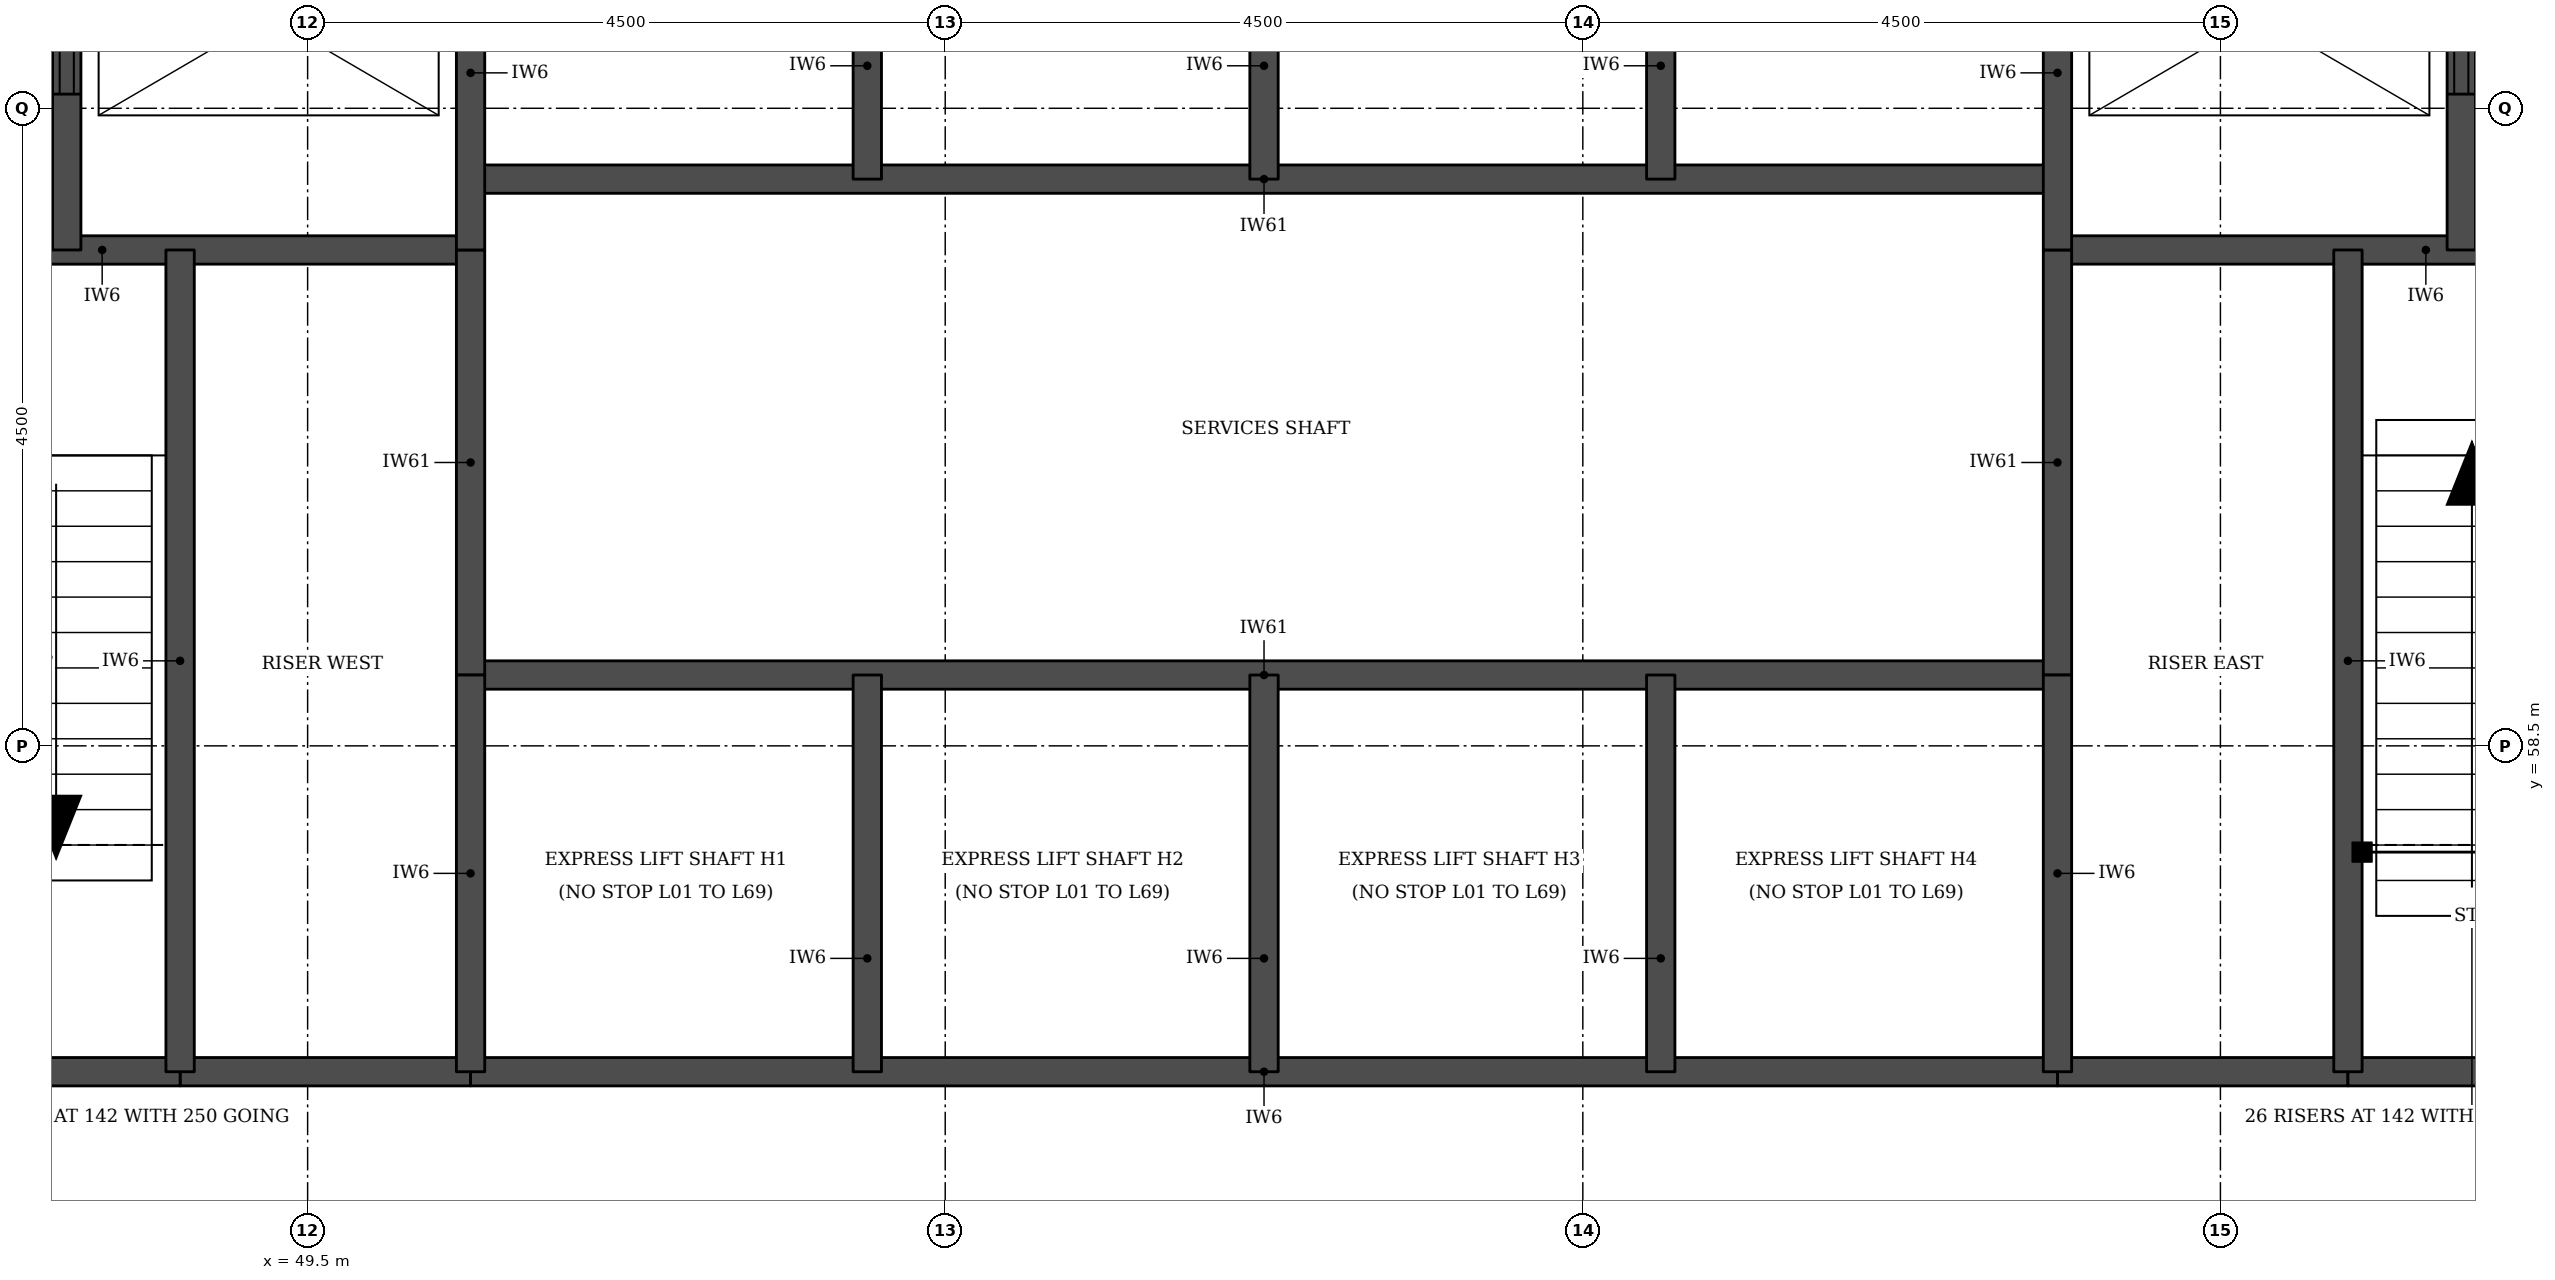
"""IFC4 building model, lengths in metres.
Left out: names, types, materials, properties, quantities, classifications, styles, units other than length and angle.
Written with IfcOpenShell. Run it as: python <this file> out.ifc"""

import sys

from ifc_helpers import new_model, si_unit, direction, frame, frame_2d, origin, place, context, subcontext, project, spatial, rectangle, extrude, element, fill, save


model = new_model("IFC4")
c1 = context("Model", 3, precision=1e-05, world=origin(), true_north=direction((0.0, 1.0)))
c2 = subcontext(c1, "Body", "Model", "MODEL_VIEW")
j1 = project(units=[si_unit("LENGTHUNIT", "METRE"), si_unit("PLANEANGLEUNIT", "RADIAN")], contexts=[c1])
p1 = place(None, origin())
s1 = spatial("IfcSite", under=j1, at=p1, CompositionType="ELEMENT")
p2 = place(p1, origin())
s2 = spatial("IfcBuilding", under=s1, at=p2, CompositionType="ELEMENT")
p3 = place(p2, frame((0.0, 0.0, 78.9)))
s3 = spatial("IfcBuildingStorey", under=s2, at=p3, CompositionType="ELEMENT", Elevation=78.9)
for number, where, z_axis, x_axis in (
    (1, (48.6, 56.2, 0.0), (0.0, 0.0, 1.0), (1.0, 0.0, 0.0)),
    (2, (61.85, 56.2, 0.0), (0.0, 0.0, 1.0), (1.0, 0.0, 0.0)),
):
    element("IfcWall", number, at=place(p3, frame(where, z_axis=z_axis, x_axis=x_axis)), inside=s3, PredefinedType="SOLIDWALL", context=c2, shape_type="SweptSolid", body=[
        extrude(rectangle(XDim=2.05, YDim=0.2, at=frame_2d((1.025, 0.0))), origin(), (0.0, 0.0, 1.0), 3.55),
    ])
p4 = place(p3, frame((45.45, 56.2, 0.0), z_axis=(0.0, 0.0, 1.0), x_axis=(1.0, 0.0, 0.0)))
e3 = element("IfcWall", 3, at=p4, inside=s3, PredefinedType="SOLIDWALL", context=c2, shape_type="SweptSolid", body=[
    extrude(rectangle(XDim=3.15, YDim=0.2, at=frame_2d((1.575, 0.0))), origin(), (0.0, 0.0, 1.0), 3.55),
])
p5 = place(p3, frame((50.65, 56.2, 0.0), z_axis=(0.0, 0.0, 1.0), x_axis=(1.0, 0.0, 0.0)))
e4 = element("IfcWall", 4, at=p5, inside=s3, PredefinedType="SOLIDWALL", context=c2, shape_type="SweptSolid", body=[
    extrude(rectangle(XDim=11.2, YDim=0.2, at=frame_2d((5.6, 0.0))), origin(), (0.0, 0.0, 1.0), 3.55),
])
p6 = place(p3, frame((63.9, 56.2, 0.0), z_axis=(0.0, 0.0, 1.0), x_axis=(1.0, 0.0, 0.0)))
e5 = element("IfcWall", 5, at=p6, inside=s3, PredefinedType="SOLIDWALL", context=c2, shape_type="SweptSolid", body=[
    extrude(rectangle(XDim=3.15, YDim=0.2, at=frame_2d((1.575, 0.0))), origin(), (0.0, 0.0, 1.0), 3.55),
])
p7 = place(p3, frame((50.65, 59.0, 0.0), z_axis=(0.0, 0.0, 1.0), x_axis=(1.0, 0.0, 0.0)))
e6 = element("IfcWall", 6, at=p7, inside=s3, PredefinedType="SOLIDWALL", context=c2, shape_type="SweptSolid", body=[
    extrude(rectangle(XDim=11.2, YDim=0.2, at=frame_2d((5.6, 0.0))), origin(), (0.0, 0.0, 1.0), 3.7),
])
for number, where, z_axis, x_axis in (
    (7, (45.45, 62.0, 0.0), (0.0, 0.0, 1.0), (1.0, 0.0, 0.0)),
    (8, (61.85, 62.0, 0.0), (0.0, 0.0, 1.0), (1.0, 0.0, 0.0)),
):
    element("IfcWall", number, at=place(p3, frame(where, z_axis=z_axis, x_axis=x_axis)), inside=s3, PredefinedType="SOLIDWALL", context=c2, shape_type="SweptSolid", body=[
        extrude(rectangle(XDim=5.2, YDim=0.2, at=frame_2d((2.6, 0.0))), origin(), (0.0, 0.0, 1.0), 3.55),
    ])
p8 = place(p3, frame((50.65, 62.5, 0.0), z_axis=(0.0, 0.0, 1.0), x_axis=(1.0, 0.0, 0.0)))
e9 = element("IfcWall", 9, at=p8, inside=s3, PredefinedType="SOLIDWALL", context=c2, shape_type="SweptSolid", body=[
    extrude(rectangle(XDim=11.2, YDim=0.2, at=frame_2d((5.6, 0.0))), origin(), (0.0, 0.0, 1.0), 3.7),
])
p9 = place(p3, frame((47.8, 62.0, 0.0), z_axis=(0.0, 0.0, 1.0), x_axis=(0.0, 1.0, 0.0)))
e10 = element("IfcWall", 10, at=p9, inside=s3, PredefinedType="SOLIDWALL", context=c2, shape_type="SweptSolid", body=[
    extrude(rectangle(XDim=3.3, YDim=0.2, at=frame_2d((1.65, 0.0))), origin(), (0.0, 0.0, 1.0), 3.55),
])
p10 = place(p9, frame((1.1, 0.0, 0.0)))
e11 = element("IfcOpeningElement", 11, at=p10, cuts=e10, PredefinedType="OPENING", context=c2, shape_type="SweptSolid", body=[
    extrude(rectangle(XDim=1.1, YDim=2.1, at=frame_2d((0.55, 1.05))), frame((0.0, 0.11, 0.0), z_axis=(0.0, -1.0, 0.0), x_axis=(1.0, 0.0, 0.0)), (0.0, 0.0, 1.0), 0.22),
])
p11 = place(p3, frame((48.6, 56.2, 0.0), z_axis=(0.0, 0.0, 1.0), x_axis=(0.0, 1.0, 0.0)))
e12 = element("IfcWall", 12, at=p11, inside=s3, PredefinedType="SOLIDWALL", context=c2, shape_type="SweptSolid", body=[
    extrude(rectangle(XDim=5.8, YDim=0.2, at=frame_2d((2.9, 0.0))), origin(), (0.0, 0.0, 1.0), 3.55),
])
p12 = place(p3, frame((50.65, 59.0, 0.0), z_axis=(0.0, 0.0, 1.0), x_axis=(0.0, 1.0, 0.0)))
e13 = element("IfcWall", 13, at=p12, inside=s3, PredefinedType="SOLIDWALL", context=c2, shape_type="SweptSolid", body=[
    extrude(rectangle(XDim=3.0, YDim=0.2, at=frame_2d((1.5, 0.0))), origin(), (0.0, 0.0, 1.0), 3.7),
])
p13 = place(p3, frame((50.65, 56.2, 0.0), z_axis=(0.0, 0.0, 1.0), x_axis=(0.0, 1.0, 0.0)))
e14 = element("IfcWall", 14, at=p13, inside=s3, PredefinedType="SOLIDWALL", context=c2, shape_type="SweptSolid", body=[
    extrude(rectangle(XDim=2.8, YDim=0.2, at=frame_2d((1.4, 0.0))), origin(), (0.0, 0.0, 1.0), 3.55),
])
p14 = place(p3, frame((50.65, 62.0, 0.0), z_axis=(0.0, 0.0, 1.0), x_axis=(0.0, 1.0, 0.0)))
e15 = element("IfcWall", 15, at=p14, inside=s3, PredefinedType="SOLIDWALL", context=c2, shape_type="SweptSolid", body=[
    extrude(rectangle(XDim=3.3, YDim=0.2, at=frame_2d((1.65, 0.0))), origin(), (0.0, 0.0, 1.0), 3.55),
])
for number, where, z_axis, x_axis in (
    (16, (53.45, 56.2, 0.0), (0.0, 0.0, 1.0), (0.0, 1.0, 0.0)),
    (17, (53.45, 62.5, 0.0), (0.0, 0.0, 1.0), (0.0, 1.0, 0.0)),
    (18, (56.25, 56.2, 0.0), (0.0, 0.0, 1.0), (0.0, 1.0, 0.0)),
    (19, (56.25, 62.5, 0.0), (0.0, 0.0, 1.0), (0.0, 1.0, 0.0)),
    (20, (59.05, 56.2, 0.0), (0.0, 0.0, 1.0), (0.0, 1.0, 0.0)),
    (21, (59.05, 62.5, 0.0), (0.0, 0.0, 1.0), (0.0, 1.0, 0.0)),
):
    element("IfcWall", number, at=place(p3, frame(where, z_axis=z_axis, x_axis=x_axis)), inside=s3, PredefinedType="SOLIDWALL", context=c2, shape_type="SweptSolid", body=[
        extrude(rectangle(XDim=2.8, YDim=0.2, at=frame_2d((1.4, 0.0))), origin(), (0.0, 0.0, 1.0), 3.55),
    ])
p15 = place(p3, frame((61.85, 59.0, 0.0), z_axis=(0.0, 0.0, 1.0), x_axis=(0.0, 1.0, 0.0)))
e22 = element("IfcWall", 22, at=p15, inside=s3, PredefinedType="SOLIDWALL", context=c2, shape_type="SweptSolid", body=[
    extrude(rectangle(XDim=3.0, YDim=0.2, at=frame_2d((1.5, 0.0))), origin(), (0.0, 0.0, 1.0), 3.7),
])
p16 = place(p3, frame((61.85, 56.2, 0.0), z_axis=(0.0, 0.0, 1.0), x_axis=(0.0, 1.0, 0.0)))
e23 = element("IfcWall", 23, at=p16, inside=s3, PredefinedType="SOLIDWALL", context=c2, shape_type="SweptSolid", body=[
    extrude(rectangle(XDim=2.8, YDim=0.2, at=frame_2d((1.4, 0.0))), origin(), (0.0, 0.0, 1.0), 3.55),
])
p17 = place(p3, frame((61.85, 62.0, 0.0), z_axis=(0.0, 0.0, 1.0), x_axis=(0.0, 1.0, 0.0)))
e24 = element("IfcWall", 24, at=p17, inside=s3, PredefinedType="SOLIDWALL", context=c2, shape_type="SweptSolid", body=[
    extrude(rectangle(XDim=3.3, YDim=0.2, at=frame_2d((1.65, 0.0))), origin(), (0.0, 0.0, 1.0), 3.55),
])
p18 = place(p3, frame((63.9, 56.2, 0.0), z_axis=(0.0, 0.0, 1.0), x_axis=(0.0, 1.0, 0.0)))
e25 = element("IfcWall", 25, at=p18, inside=s3, PredefinedType="SOLIDWALL", context=c2, shape_type="SweptSolid", body=[
    extrude(rectangle(XDim=5.8, YDim=0.2, at=frame_2d((2.9, 0.0))), origin(), (0.0, 0.0, 1.0), 3.55),
])
p19 = place(p3, frame((64.7, 62.0, 0.0), z_axis=(0.0, 0.0, 1.0), x_axis=(0.0, 1.0, 0.0)))
e26 = element("IfcWall", 26, at=p19, inside=s3, PredefinedType="SOLIDWALL", context=c2, shape_type="SweptSolid", body=[
    extrude(rectangle(XDim=3.3, YDim=0.2, at=frame_2d((1.65, 0.0))), origin(), (0.0, 0.0, 1.0), 3.55),
])
p20 = place(p19, frame((1.1, 0.0, 0.0)))
e27 = element("IfcOpeningElement", 27, at=p20, cuts=e26, PredefinedType="OPENING", context=c2, shape_type="SweptSolid", body=[
    extrude(rectangle(XDim=1.1, YDim=2.1, at=frame_2d((0.55, 1.05))), frame((0.0, 0.11, 0.0), z_axis=(0.0, -1.0, 0.0), x_axis=(1.0, 0.0, 0.0)), (0.0, 0.0, 1.0), 0.22),
])
p21 = place(p10, origin())
e28 = element("IfcDoor", 28, at=p21, inside=s3, OperationType="DOUBLE_DOOR_SLIDING", PredefinedType="DOOR", context=c2, shape_type="SweptSolid", body=[
    extrude(rectangle(XDim=1.1, YDim=2.1, at=frame_2d((0.55, 1.05))), frame((0.0, 0.025, 0.0), z_axis=(0.0, -1.0, 0.0), x_axis=(1.0, 0.0, 0.0)), (0.0, 0.0, 1.0), 0.05),
])
fill(e11, e28)
p22 = place(p20, origin())
e29 = element("IfcDoor", 29, at=p22, inside=s3, OperationType="DOUBLE_DOOR_SLIDING", PredefinedType="DOOR", context=c2, shape_type="SweptSolid", body=[
    extrude(rectangle(XDim=1.1, YDim=2.1, at=frame_2d((0.55, 1.05))), frame((0.0, 0.025, 0.0), z_axis=(0.0, -1.0, 0.0), x_axis=(1.0, 0.0, 0.0)), (0.0, 0.0, 1.0), 0.05),
])
fill(e27, e29)
save(model, sys.argv[1])
